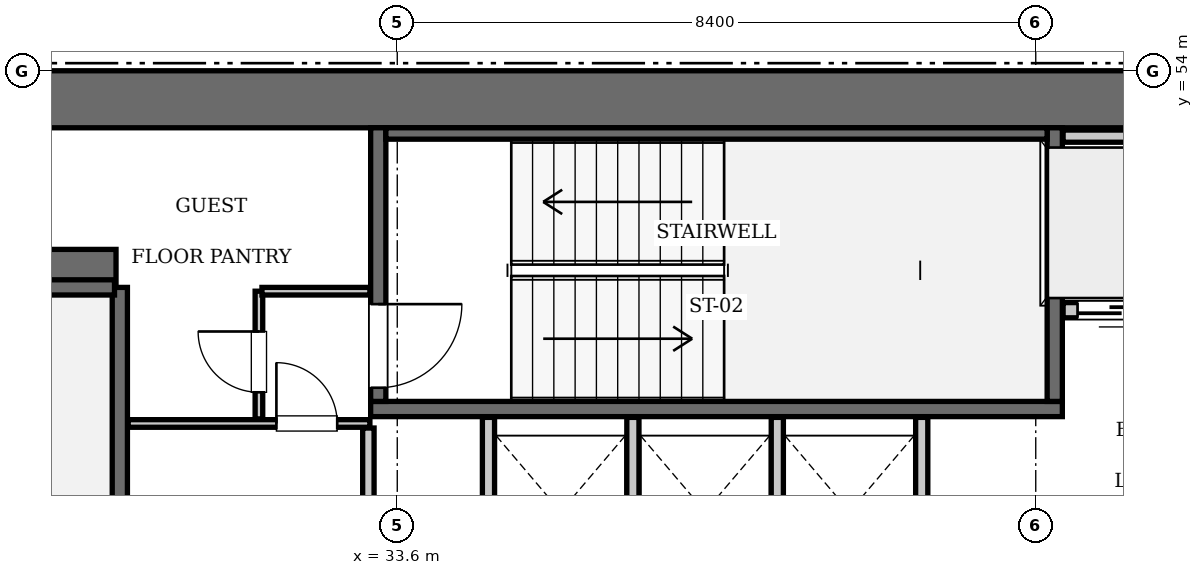
"""IFC4 building model, lengths in metres.
Left out: names, types, materials, properties, quantities, classifications, styles, units other than length and angle.
Written with IfcOpenShell. Run it as: python <this file> out.ifc"""

import sys

from ifc_helpers import new_model, si_unit, direction, frame, frame_2d, origin, place, context, subcontext, project, spatial, rectangle, extrude, element, fill, save


model = new_model("IFC4")
c1 = context("Model", 3, precision=1e-05, world=origin(), true_north=direction((0.0, 1.0)))
c2 = subcontext(c1, "Body", "Model", "MODEL_VIEW")
j1 = project(units=[si_unit("LENGTHUNIT", "METRE"), si_unit("PLANEANGLEUNIT", "RADIAN")], contexts=[c1])
p1 = place(None, origin())
s1 = spatial("IfcSite", under=j1, at=p1, CompositionType="ELEMENT")
p2 = place(p1, origin())
s2 = spatial("IfcBuilding", under=s1, at=p2, CompositionType="ELEMENT")
p3 = place(p2, frame((0.0, 0.0, 219.8)))
s3 = spatial("IfcBuildingStorey", under=s2, at=p3, CompositionType="ELEMENT", Elevation=219.8)
p4 = place(p3, frame((25.2, 53.625, 0.0), z_axis=(0.0, 0.0, 1.0), x_axis=(1.0, 0.0, 0.0)))
e1 = element("IfcWall", 1, at=p4, inside=s3, PredefinedType="SHEAR", context=c2, shape_type="SweptSolid", body=[
    extrude(rectangle(XDim=25.2, YDim=0.75, at=frame_2d((12.6, 0.0))), origin(), (0.0, 0.0, 1.0), 3.85),
])
p5 = place(p3, frame((25.95, 51.4, 0.0), z_axis=(0.0, 0.0, 1.0), x_axis=(1.0, 0.0, 0.0)))
e2 = element("IfcWall", 2, at=p5, inside=s3, PredefinedType="SHEAR", context=c2, shape_type="SweptSolid", body=[
    extrude(rectangle(XDim=3.95, YDim=0.5, at=frame_2d((1.975, 0.0))), origin(), (0.0, 0.0, 1.0), 3.85),
])
p6 = place(p3, frame((29.95, 42.15, 0.0), z_axis=(0.0, 0.0, 1.0), x_axis=(0.0, 1.0, 0.0)))
e3 = element("IfcWall", 3, at=p6, inside=s3, PredefinedType="SOLIDWALL", context=c2, shape_type="SweptSolid", body=[
    extrude(rectangle(XDim=9.0, YDim=0.2, at=frame_2d((4.5, 0.0))), origin(), (0.0, 0.0, 1.0), 3.61),
])
p7 = place(p3, frame((26.38, 51.15, 0.0), z_axis=(0.0, 0.0, 1.0), x_axis=(1.0, 0.0, 0.0)))
e4 = element("IfcWall", 4, at=p7, inside=s3, PredefinedType="SOLIDWALL", context=c2, shape_type="SweptSolid", body=[
    extrude(rectangle(XDim=3.5, YDim=0.2, at=frame_2d((1.75, 0.0))), origin(), (0.0, 0.0, 1.0), 3.61),
])
p8 = place(p3, frame((33.25, 49.55, 0.0), z_axis=(0.0, 0.0, 1.0), x_axis=(1.0, 0.0, 0.0)))
e5 = element("IfcWall", 5, at=p8, inside=s3, PredefinedType="SOLIDWALL", context=c2, shape_type="SweptSolid", body=[
    extrude(rectangle(XDim=9.1, YDim=0.2, at=frame_2d((4.55, 0.0))), origin(), (0.0, 0.0, 1.0), 3.61),
])
p9 = place(p3, frame((42.25, 49.65, 0.0), z_axis=(0.0, 0.0, 1.0), x_axis=(0.0, 1.0, 0.0)))
e6 = element("IfcWall", 6, at=p9, inside=s3, PredefinedType="SOLIDWALL", context=c2, shape_type="SweptSolid", body=[
    extrude(rectangle(XDim=3.6, YDim=0.2, at=frame_2d((1.8, 0.0))), origin(), (0.0, 0.0, 1.0), 3.61),
])
p10 = place(p3, frame((33.35, 49.65, 0.0), z_axis=(0.0, 0.0, 1.0), x_axis=(0.0, 1.0, 0.0)))
e7 = element("IfcWall", 7, at=p10, inside=s3, PredefinedType="SOLIDWALL", context=c2, shape_type="SweptSolid", body=[
    extrude(rectangle(XDim=3.6, YDim=0.2, at=frame_2d((1.8, 0.0))), origin(), (0.0, 0.0, 1.0), 3.61),
])
p11 = place(p10, frame((0.18, 0.0, 0.0)))
e8 = element("IfcOpeningElement", 8, at=p11, cuts=e7, PredefinedType="OPENING", context=c2, shape_type="SweptSolid", body=[
    extrude(rectangle(XDim=1.1, YDim=2.15, at=frame_2d((0.55, 1.075))), frame((0.0, 0.11, 0.0), z_axis=(0.0, -1.0, 0.0), x_axis=(1.0, 0.0, 0.0)), (0.0, 0.0, 1.0), 0.22),
])
p12 = place(p3, frame((33.45, 53.175, 0.0), z_axis=(0.0, 0.0, 1.0), x_axis=(1.0, 0.0, 0.0)))
e9 = element("IfcWall", 9, at=p12, inside=s3, PredefinedType="SOLIDWALL", context=c2, shape_type="SweptSolid", body=[
    extrude(rectangle(XDim=8.7, YDim=0.15, at=frame_2d((4.35, 0.0))), origin(), (0.0, 0.0, 1.0), 3.61),
])
p13 = place(p3, frame((42.36, 50.85, 0.0), z_axis=(0.0, 0.0, 1.0), x_axis=(1.0, 0.0, 0.0)))
e10 = element("IfcWall", 10, at=p13, inside=s3, PredefinedType="SOLIDWALL", context=c2, shape_type="SweptSolid", body=[
    extrude(rectangle(XDim=1.38, YDim=0.2, at=frame_2d((0.69, 0.0))), origin(), (0.0, 0.0, 1.0), 3.61),
])
p14 = place(p13, frame((0.19, 0.0, 0.0)))
e11 = element("IfcOpeningElement", 11, at=p14, cuts=e10, PredefinedType="OPENING", context=c2, shape_type="SweptSolid", body=[
    extrude(rectangle(XDim=1.0, YDim=2.15, at=frame_2d((0.5, 1.075))), frame((0.0, 0.11, 0.0), z_axis=(0.0, -1.0, 0.0), x_axis=(1.0, 0.0, 0.0)), (0.0, 0.0, 1.0), 0.22),
])
p15 = place(p3, frame((42.36, 53.14, 0.0), z_axis=(0.0, 0.0, 1.0), x_axis=(1.0, 0.0, 0.0)))
e12 = element("IfcWall", 12, at=p15, inside=s3, PredefinedType="SOLIDWALL", context=c2, shape_type="SweptSolid", body=[
    extrude(rectangle(XDim=3.14, YDim=0.16, at=frame_2d((1.57, 0.0))), origin(), (0.0, 0.0, 1.0), 3.61),
])
for number, where, z_axis, x_axis in (
    (13, (34.8, 47.25, 0.0), (0.0, 0.0, 1.0), (0.0, 1.0, 0.0)),
    (14, (36.7, 47.25, 0.0), (0.0, 0.0, 1.0), (0.0, 1.0, 0.0)),
    (15, (38.6, 47.25, 0.0), (0.0, 0.0, 1.0), (0.0, 1.0, 0.0)),
    (16, (40.5, 47.25, 0.0), (0.0, 0.0, 1.0), (0.0, 1.0, 0.0)),
):
    element("IfcWall", number, at=place(p3, frame(where, z_axis=z_axis, x_axis=x_axis)), inside=s3, PredefinedType="SOLIDWALL", context=c2, shape_type="SweptSolid", body=[
        extrude(rectangle(XDim=2.19, YDim=0.16, at=frame_2d((1.095, 0.0))), origin(), (0.0, 0.0, 1.0), 3.61),
    ])
p16 = place(p3, frame((33.22, 45.14, 0.0), z_axis=(0.0, 0.0, 1.0), x_axis=(0.0, 1.0, 0.0)))
e17 = element("IfcWall", 17, at=p16, inside=s3, PredefinedType="PARTITIONING", context=c2, shape_type="SweptSolid", body=[
    extrude(rectangle(XDim=4.16, YDim=0.15, at=frame_2d((2.08, 0.0))), origin(), (0.0, 0.0, 1.0), 3.61),
])
p17 = place(p3, frame((30.06, 49.36, 0.0), z_axis=(0.0, 0.0, 1.0), x_axis=(1.0, 0.0, 0.0)))
e18 = element("IfcWall", 18, at=p17, inside=s3, PredefinedType="PARTITIONING", context=c2, shape_type="SweptSolid", body=[
    extrude(rectangle(XDim=3.18, YDim=0.1, at=frame_2d((1.59, 0.0))), origin(), (0.0, 0.0, 1.0), 3.61),
])
p18 = place(p17, frame((1.95, 0.0, 0.0)))
e19 = element("IfcOpeningElement", 19, at=p18, cuts=e18, PredefinedType="OPENING", context=c2, shape_type="SweptSolid", body=[
    extrude(rectangle(XDim=0.8, YDim=2.05, at=frame_2d((0.4, 1.025))), frame((0.0, 0.06, 0.0), z_axis=(0.0, -1.0, 0.0), x_axis=(1.0, 0.0, 0.0)), (0.0, 0.0, 1.0), 0.12),
])
p19 = place(p3, frame((31.78, 49.42, 0.0), z_axis=(0.0, 0.0, 1.0), x_axis=(0.0, 1.0, 0.0)))
e20 = element("IfcWall", 20, at=p19, inside=s3, PredefinedType="PARTITIONING", context=c2, shape_type="SweptSolid", body=[
    extrude(rectangle(XDim=1.68, YDim=0.1, at=frame_2d((0.84, 0.0))), origin(), (0.0, 0.0, 1.0), 3.61),
])
p20 = place(p19, frame((0.35, 0.0, 0.0)))
e21 = element("IfcOpeningElement", 21, at=p20, cuts=e20, PredefinedType="OPENING", context=c2, shape_type="SweptSolid", body=[
    extrude(rectangle(XDim=0.8, YDim=2.05, at=frame_2d((0.4, 1.025))), frame((0.0, 0.06, 0.0), z_axis=(0.0, -1.0, 0.0), x_axis=(1.0, 0.0, 0.0)), (0.0, 0.0, 1.0), 0.12),
])
p21 = place(p3, frame((31.82, 51.1, 0.0), z_axis=(0.0, 0.0, 1.0), x_axis=(1.0, 0.0, 0.0)))
e22 = element("IfcWall", 22, at=p21, inside=s3, PredefinedType="PARTITIONING", context=c2, shape_type="SweptSolid", body=[
    extrude(rectangle(XDim=1.42, YDim=0.1, at=frame_2d((0.71, 0.0))), origin(), (0.0, 0.0, 1.0), 3.61),
])
p22 = place(p11, frame((1.1, 0.0, 0.0), z_axis=(0.0, 0.0, 1.0), x_axis=(-1.0, 0.0, 0.0)))
e23 = element("IfcDoor", 23, at=p22, inside=s3, OperationType="SINGLE_SWING_LEFT", PredefinedType="DOOR", context=c2, shape_type="SweptSolid", body=[
    extrude(rectangle(XDim=1.1, YDim=2.15, at=frame_2d((0.55, 1.075))), frame((0.0, 0.025, 0.0), z_axis=(0.0, -1.0, 0.0), x_axis=(1.0, 0.0, 0.0)), (0.0, 0.0, 1.0), 0.05),
])
fill(e8, e23)
p23 = place(p14, frame((1.0, 0.0, 0.0), z_axis=(0.0, 0.0, 1.0), x_axis=(-1.0, 0.0, 0.0)))
e24 = element("IfcDoor", 24, at=p23, inside=s3, OperationType="SLIDING_TO_LEFT", PredefinedType="DOOR", context=c2, shape_type="SweptSolid", body=[
    extrude(rectangle(XDim=1.0, YDim=2.15, at=frame_2d((0.5, 1.075))), frame((0.0, 0.025, 0.0), z_axis=(0.0, -1.0, 0.0), x_axis=(1.0, 0.0, 0.0)), (0.0, 0.0, 1.0), 0.05),
])
fill(e11, e24)
p24 = place(p18, origin())
e25 = element("IfcDoor", 25, at=p24, inside=s3, OperationType="SINGLE_SWING_LEFT", PredefinedType="DOOR", context=c2, shape_type="SweptSolid", body=[
    extrude(rectangle(XDim=0.8, YDim=2.05, at=frame_2d((0.4, 1.025))), frame((0.0, 0.025, 0.0), z_axis=(0.0, -1.0, 0.0), x_axis=(1.0, 0.0, 0.0)), (0.0, 0.0, 1.0), 0.05),
])
fill(e19, e25)
p25 = place(p20, origin())
e26 = element("IfcDoor", 26, at=p25, inside=s3, OperationType="SINGLE_SWING_RIGHT", PredefinedType="DOOR", context=c2, shape_type="SweptSolid", body=[
    extrude(rectangle(XDim=0.8, YDim=2.05, at=frame_2d((0.4, 1.025))), frame((0.0, 0.025, 0.0), z_axis=(0.0, -1.0, 0.0), x_axis=(1.0, 0.0, 0.0)), (0.0, 0.0, 1.0), 0.05),
])
fill(e21, e26)
save(model, sys.argv[1])
